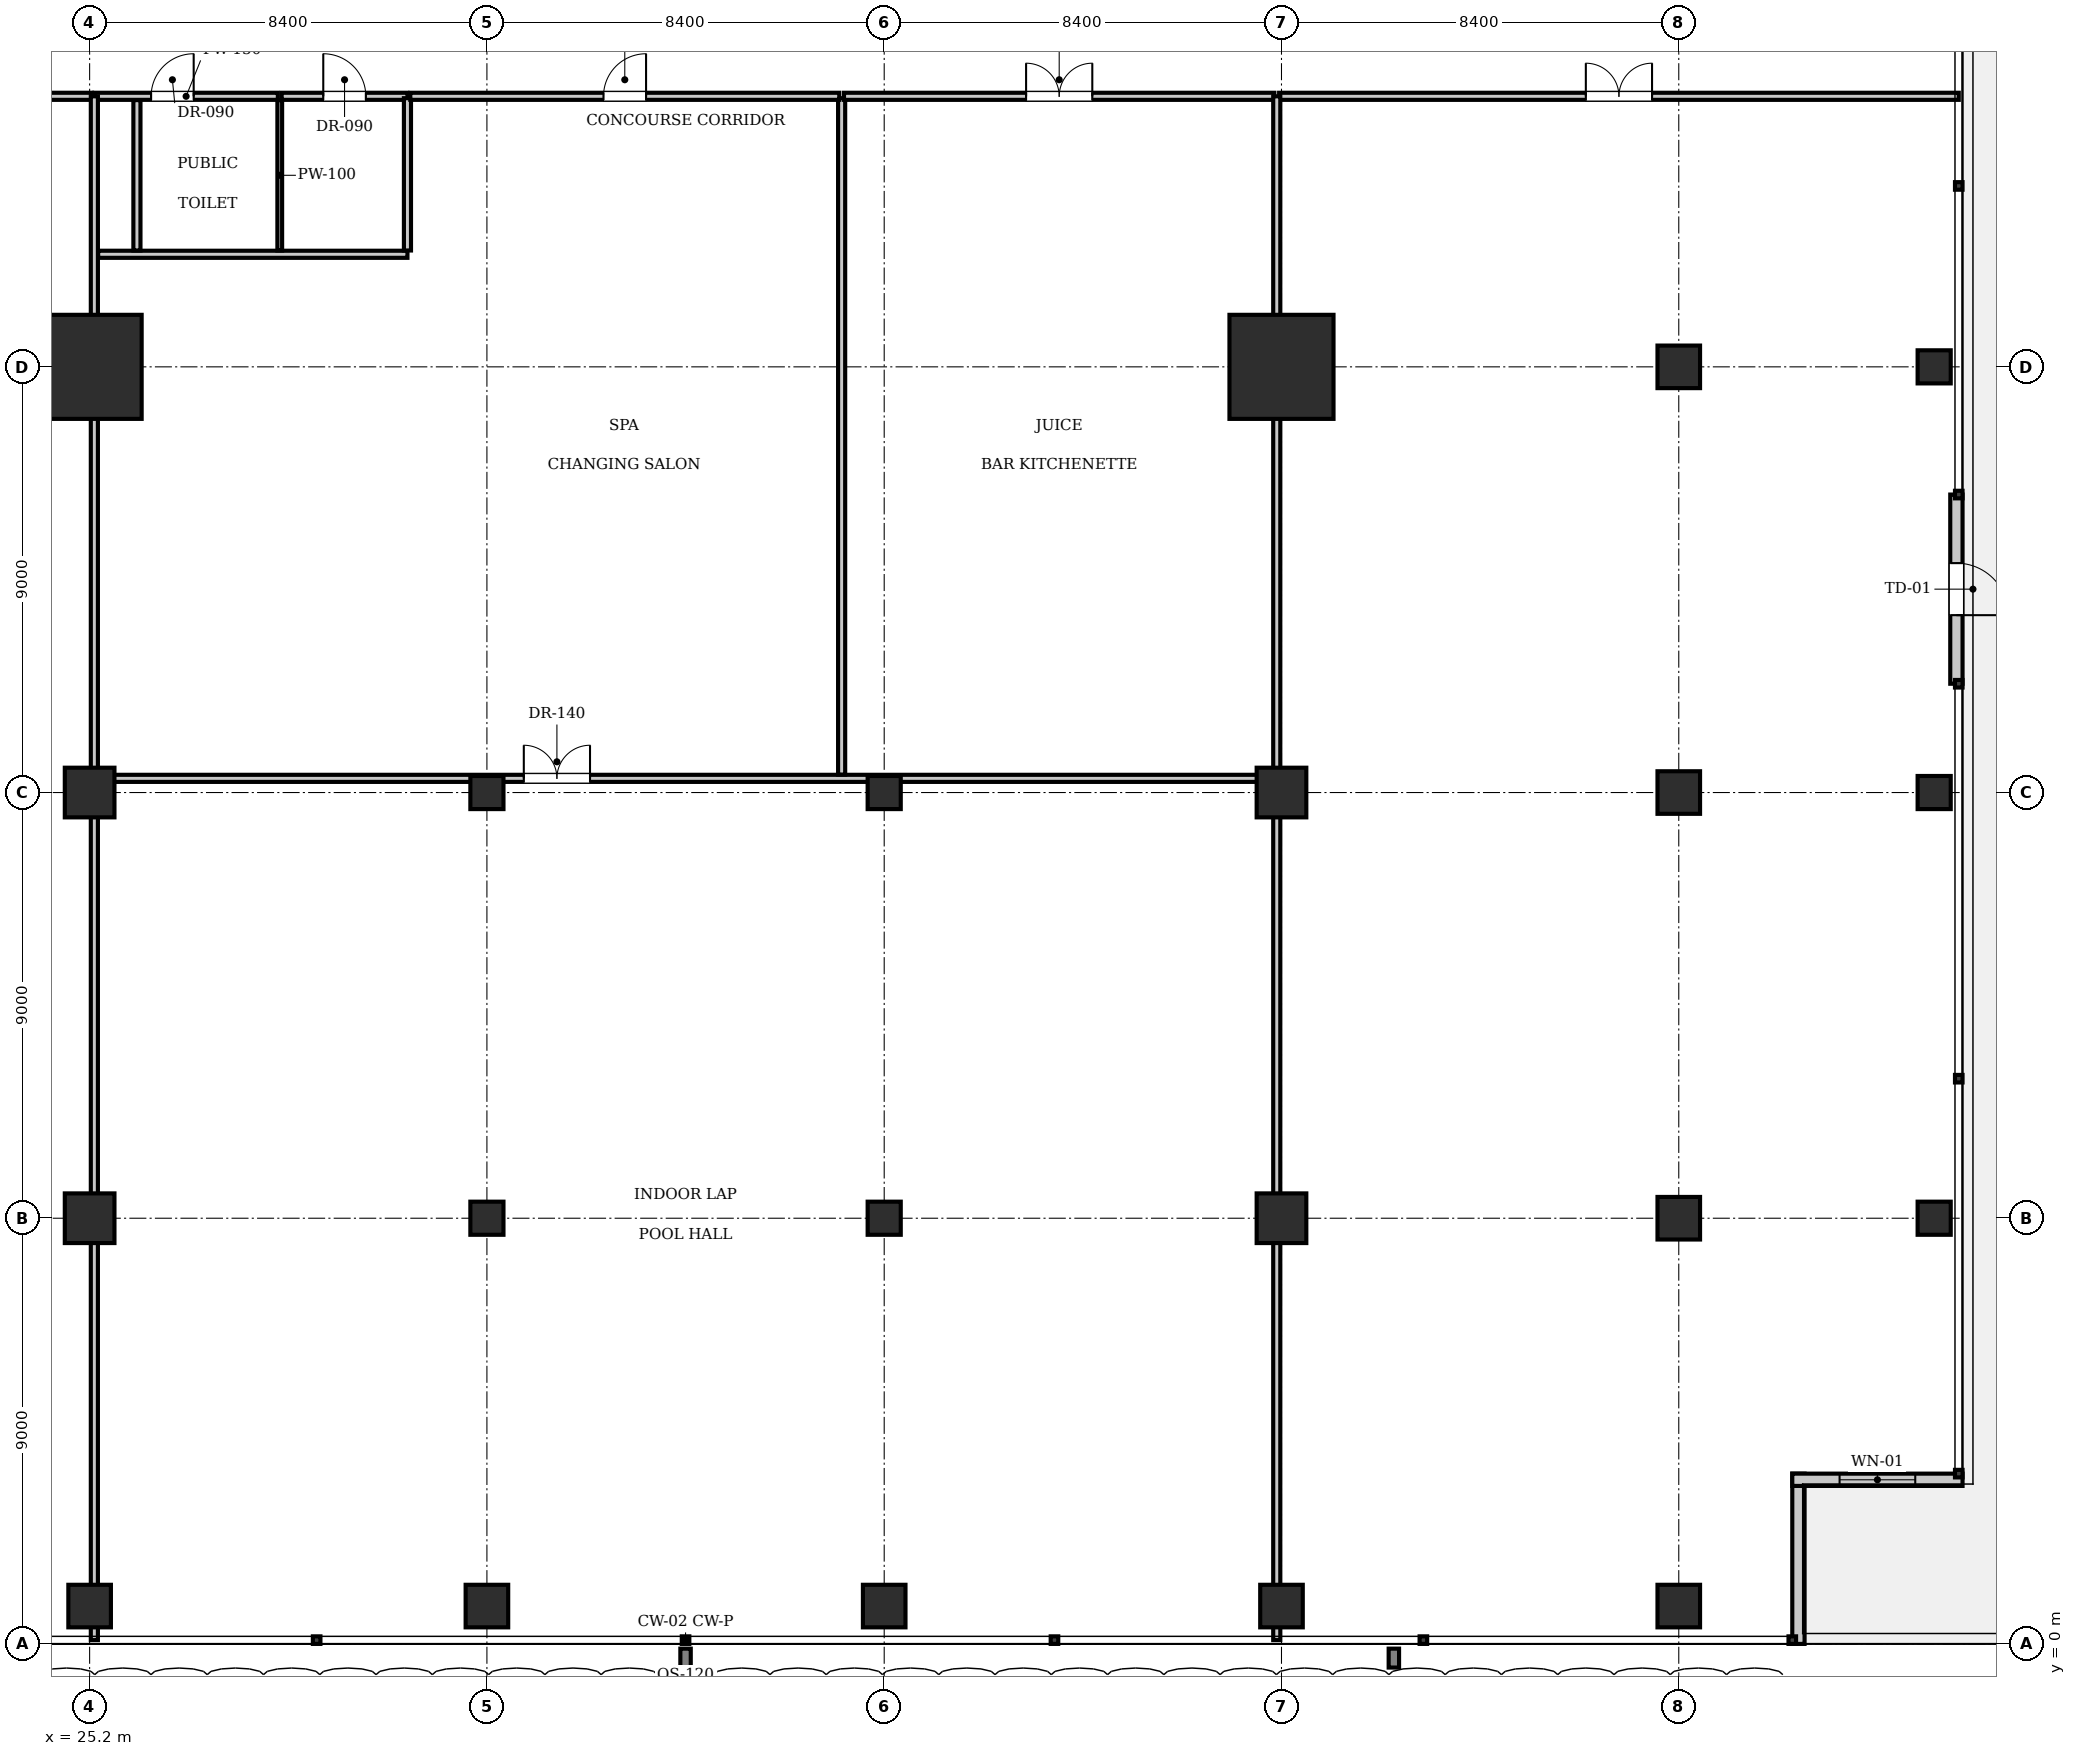
"""IFC4 building model, lengths in metres.
Left out: names, types, materials, properties, quantities, classifications, styles, units other than length and angle.
Written with IfcOpenShell. Run it as: python <this file> out.ifc"""

import sys

from ifc_helpers import new_model, si_unit, direction, frame, frame_2d, origin, origin_2d, place, context, subcontext, project, spatial, rectangle, i_section, extrude, element, fill, save


model = new_model("IFC4")
c1 = context("Model", 3, precision=1e-05, world=origin(), true_north=direction((0.0, 1.0)))
c2 = subcontext(c1, "Body", "Model", "MODEL_VIEW")
j1 = project(units=[si_unit("LENGTHUNIT", "METRE"), si_unit("PLANEANGLEUNIT", "RADIAN")], contexts=[c1])
p1 = place(None, origin())
s1 = spatial("IfcSite", under=j1, at=p1, CompositionType="ELEMENT")
p2 = place(p1, origin())
s2 = spatial("IfcBuilding", under=s1, at=p2, CompositionType="ELEMENT")
p3 = place(p2, frame((0.0, 0.0, 26.95)))
s3 = spatial("IfcBuildingStorey", under=s2, at=p3, CompositionType="ELEMENT", Elevation=26.95)
for number, where, z_axis, x_axis in (
    (1, (25.2, 27.0, 0.0), (0.0, 0.0, 1.0), (1.0, 0.0, 0.0)),
    (2, (50.4, 27.0, 0.0), (0.0, 0.0, 1.0), (1.0, 0.0, 0.0)),
):
    element("IfcColumn", number, at=place(p3, frame(where, z_axis=z_axis, x_axis=x_axis)), inside=s3, PredefinedType="COLUMN", context=c2, shape_type="SweptSolid", body=[
        extrude(rectangle(XDim=2.2, YDim=2.2, at=origin_2d()), origin(), (0.0, 0.0, 1.0), 3.85),
    ])
for number, where, z_axis, x_axis in (
    (3, (25.2, 18.0, 0.0), (0.0, 0.0, 1.0), (1.0, 0.0, 0.0)),
    (4, (50.4, 18.0, 0.0), (0.0, 0.0, 1.0), (1.0, 0.0, 0.0)),
    (5, (25.2, 9.0, 0.0), (0.0, 0.0, 1.0), (1.0, 0.0, 0.0)),
    (6, (50.4, 9.0, 0.0), (0.0, 0.0, 1.0), (1.0, 0.0, 0.0)),
):
    element("IfcColumn", number, at=place(p3, frame(where, z_axis=z_axis, x_axis=x_axis)), inside=s3, PredefinedType="COLUMN", context=c2, shape_type="SweptSolid", body=[
        extrude(rectangle(XDim=1.05, YDim=1.05, at=origin_2d()), origin(), (0.0, 0.0, 1.0), 3.85),
    ])
for number, where, z_axis, x_axis in (
    (7, (33.6, 9.0, -0.24), (0.0, 0.0, 1.0), (1.0, 0.0, 0.0)),
    (8, (42.0, 9.0, -0.24), (0.0, 0.0, 1.0), (1.0, 0.0, 0.0)),
    (9, (33.6, 18.0, -0.24), (0.0, 0.0, 1.0), (1.0, 0.0, 0.0)),
    (10, (42.0, 18.0, -0.24), (0.0, 0.0, 1.0), (1.0, 0.0, 0.0)),
):
    element("IfcColumn", number, at=place(p3, frame(where, z_axis=z_axis, x_axis=x_axis)), inside=s3, PredefinedType="COLUMN", context=c2, shape_type="SweptSolid", body=[
        extrude(i_section(OverallWidth=0.7, OverallDepth=0.7, WebThickness=0.028, FlangeThickness=0.044, at=origin_2d()), origin(), (0.0, 0.0, 1.0), 4.09),
    ])
for number, where, z_axis, x_axis in (
    (11, (58.8, 9.0, 0.0), (0.0, 0.0, 1.0), (1.0, 0.0, 0.0)),
    (12, (58.8, 18.0, 0.0), (0.0, 0.0, 1.0), (1.0, 0.0, 0.0)),
    (13, (58.8, 27.0, 0.0), (0.0, 0.0, 1.0), (1.0, 0.0, 0.0)),
    (14, (25.2, 0.8, 0.0), (0.0, 0.0, 1.0), (1.0, 0.0, 0.0)),
    (15, (33.6, 0.8, 0.0), (0.0, 0.0, 1.0), (1.0, 0.0, 0.0)),
    (16, (42.0, 0.8, 0.0), (0.0, 0.0, 1.0), (1.0, 0.0, 0.0)),
    (17, (50.4, 0.8, 0.0), (0.0, 0.0, 1.0), (1.0, 0.0, 0.0)),
    (18, (58.8, 0.8, 0.0), (0.0, 0.0, 1.0), (1.0, 0.0, 0.0)),
):
    element("IfcColumn", number, at=place(p3, frame(where, z_axis=z_axis, x_axis=x_axis)), inside=s3, PredefinedType="COLUMN", context=c2, shape_type="SweptSolid", body=[
        extrude(rectangle(XDim=0.9, YDim=0.9, at=origin_2d()), origin(), (0.0, 0.0, 1.0), 3.85),
    ])
for number, where, z_axis, x_axis in (
    (19, (64.2, 9.0, -0.24), (0.0, 0.0, 1.0), (1.0, 0.0, 0.0)),
    (20, (64.2, 18.0, -0.24), (0.0, 0.0, 1.0), (1.0, 0.0, 0.0)),
    (21, (64.2, 27.0, -0.24), (0.0, 0.0, 1.0), (1.0, 0.0, 0.0)),
):
    element("IfcColumn", number, at=place(p3, frame(where, z_axis=z_axis, x_axis=x_axis)), inside=s3, PredefinedType="COLUMN", context=c2, shape_type="SweptSolid", body=[
        extrude(i_section(OverallWidth=0.7, OverallDepth=0.7, WebThickness=0.028, FlangeThickness=0.044, at=origin_2d()), origin(), (0.0, 0.0, 1.0), 4.09),
    ])
p4 = place(p3, frame((61.33, 3.6, 0.0), z_axis=(0.0, 0.0, 1.0), x_axis=(0.0, -1.0, 0.0)))
e22 = element("IfcWall", 22, at=p4, inside=s3, PredefinedType="SOLIDWALL", context=c2, shape_type="SweptSolid", body=[
    extrude(rectangle(XDim=3.6, YDim=0.26, at=frame_2d((1.8, 0.0))), origin(), (0.0, 0.0, 1.0), 3.61),
])
p5 = place(p3, frame((64.8, 3.47, 0.0), z_axis=(0.0, 0.0, 1.0), x_axis=(-1.0, 0.0, 0.0)))
e23 = element("IfcWall", 23, at=p5, inside=s3, PredefinedType="SOLIDWALL", context=c2, shape_type="SweptSolid", body=[
    extrude(rectangle(XDim=3.6, YDim=0.26, at=frame_2d((1.8, 0.0))), origin(), (0.0, 0.0, 1.0), 3.61),
])
p6 = place(p5, frame((1.0, 0.0, 0.9)))
e24 = element("IfcOpeningElement", 24, at=p6, cuts=e23, PredefinedType="OPENING", context=c2, shape_type="SweptSolid", body=[
    extrude(rectangle(XDim=1.6, YDim=2.1, at=frame_2d((0.8, 1.05))), frame((0.0, 0.14, 0.0), z_axis=(0.0, -1.0, 0.0), x_axis=(1.0, 0.0, 0.0)), (0.0, 0.0, 1.0), 0.28),
])
p7 = place(p3, frame((64.67, 20.3, 0.0), z_axis=(0.0, 0.0, 1.0), x_axis=(0.0, 1.0, 0.0)))
e25 = element("IfcWall", 25, at=p7, inside=s3, PredefinedType="SOLIDWALL", context=c2, shape_type="SweptSolid", body=[
    extrude(rectangle(XDim=4.0, YDim=0.26, at=frame_2d((2.0, 0.0))), origin(), (0.0, 0.0, 1.0), 3.61),
])
p8 = place(p7, frame((1.45, 0.0, 0.0)))
e26 = element("IfcOpeningElement", 26, at=p8, cuts=e25, PredefinedType="OPENING", context=c2, shape_type="SweptSolid", body=[
    extrude(rectangle(XDim=1.1, YDim=2.2, at=frame_2d((0.55, 1.1))), frame((0.0, 0.14, 0.0), z_axis=(0.0, -1.0, 0.0), x_axis=(1.0, 0.0, 0.0)), (0.0, 0.0, 1.0), 0.28),
])
p9 = place(p3, frame((25.3, 32.72, 0.0), z_axis=(0.0, 0.0, 1.0), x_axis=(1.0, 0.0, 0.0)))
e27 = element("IfcWall", 27, at=p9, inside=s3, PredefinedType="PARTITIONING", context=c2, shape_type="SweptSolid", body=[
    extrude(rectangle(XDim=3.88, YDim=0.15, at=frame_2d((1.94, 0.0))), origin(), (0.0, 0.0, 1.0), 3.61),
])
p10 = place(p9, frame((1.2, 0.0, 0.0)))
e28 = element("IfcOpeningElement", 28, at=p10, cuts=e27, PredefinedType="OPENING", context=c2, shape_type="SweptSolid", body=[
    extrude(rectangle(XDim=0.9, YDim=2.1, at=frame_2d((0.45, 1.05))), frame((0.0, 0.085, 0.0), z_axis=(0.0, -1.0, 0.0), x_axis=(1.0, 0.0, 0.0)), (0.0, 0.0, 1.0), 0.17),
])
p11 = place(p3, frame((29.26, 32.72, 0.0), z_axis=(0.0, 0.0, 1.0), x_axis=(1.0, 0.0, 0.0)))
e29 = element("IfcWall", 29, at=p11, inside=s3, PredefinedType="PARTITIONING", context=c2, shape_type="SweptSolid", body=[
    extrude(rectangle(XDim=2.66, YDim=0.15, at=frame_2d((1.33, 0.0))), origin(), (0.0, 0.0, 1.0), 3.61),
])
p12 = place(p11, frame((0.88, 0.0, 0.0)))
e30 = element("IfcOpeningElement", 30, at=p12, cuts=e29, PredefinedType="OPENING", context=c2, shape_type="SweptSolid", body=[
    extrude(rectangle(XDim=0.9, YDim=2.1, at=frame_2d((0.45, 1.05))), frame((0.0, 0.085, 0.0), z_axis=(0.0, -1.0, 0.0), x_axis=(1.0, 0.0, 0.0)), (0.0, 0.0, 1.0), 0.17),
])
p13 = place(p3, frame((25.38, 29.38, 0.0), z_axis=(0.0, 0.0, 1.0), x_axis=(1.0, 0.0, 0.0)))
e31 = element("IfcWall", 31, at=p13, inside=s3, PredefinedType="PARTITIONING", context=c2, shape_type="SweptSolid", body=[
    extrude(rectangle(XDim=6.54, YDim=0.15, at=frame_2d((3.27, 0.0))), origin(), (0.0, 0.0, 1.0), 3.61),
])
p14 = place(p3, frame((26.2, 29.46, 0.0), z_axis=(0.0, 0.0, 1.0), x_axis=(0.0, 1.0, 0.0)))
e32 = element("IfcWall", 32, at=p14, inside=s3, PredefinedType="PARTITIONING", context=c2, shape_type="SweptSolid", body=[
    extrude(rectangle(XDim=3.18, YDim=0.15, at=frame_2d((1.59, 0.0))), origin(), (0.0, 0.0, 1.0), 3.61),
])
p15 = place(p3, frame((29.22, 29.46, 0.0), z_axis=(0.0, 0.0, 1.0), x_axis=(0.0, 1.0, 0.0)))
e33 = element("IfcWall", 33, at=p15, inside=s3, PredefinedType="PARTITIONING", context=c2, shape_type="SweptSolid", body=[
    extrude(rectangle(XDim=3.18, YDim=0.1, at=frame_2d((1.59, 0.0))), origin(), (0.0, 0.0, 1.0), 3.61),
])
p16 = place(p3, frame((31.92, 29.46, 0.0), z_axis=(0.0, 0.0, 1.0), x_axis=(0.0, 1.0, 0.0)))
e34 = element("IfcWall", 34, at=p16, inside=s3, PredefinedType="PARTITIONING", context=c2, shape_type="SweptSolid", body=[
    extrude(rectangle(XDim=3.22, YDim=0.15, at=frame_2d((1.61, 0.0))), origin(), (0.0, 0.0, 1.0), 3.61),
])
p17 = place(p3, frame((25.38, 18.3, 0.0), z_axis=(0.0, 0.0, 1.0), x_axis=(1.0, 0.0, 0.0)))
e35 = element("IfcWall", 35, at=p17, inside=s3, PredefinedType="PARTITIONING", context=c2, shape_type="SweptSolid", body=[
    extrude(rectangle(XDim=24.84, YDim=0.15, at=frame_2d((12.42, 0.0))), origin(), (0.0, 0.0, 1.0), 3.61),
])
p18 = place(p17, frame((9.0, 0.0, 0.0)))
e36 = element("IfcOpeningElement", 36, at=p18, cuts=e35, PredefinedType="OPENING", context=c2, shape_type="SweptSolid", body=[
    extrude(rectangle(XDim=1.4, YDim=2.2, at=frame_2d((0.7, 1.1))), frame((0.0, 0.085, 0.0), z_axis=(0.0, -1.0, 0.0), x_axis=(1.0, 0.0, 0.0)), (0.0, 0.0, 1.0), 0.17),
])
p19 = place(p3, frame((41.1, 18.38, 0.0), z_axis=(0.0, 0.0, 1.0), x_axis=(0.0, 1.0, 0.0)))
e37 = element("IfcWall", 37, at=p19, inside=s3, PredefinedType="PARTITIONING", context=c2, shape_type="SweptSolid", body=[
    extrude(rectangle(XDim=14.3, YDim=0.15, at=frame_2d((7.15, 0.0))), origin(), (0.0, 0.0, 1.0), 3.61),
])
p20 = place(p3, frame((10.88, 32.72, 0.0), z_axis=(0.0, 0.0, 1.0), x_axis=(1.0, 0.0, 0.0)))
e38 = element("IfcWall", 38, at=p20, inside=s3, PredefinedType="PARTITIONING", context=c2, shape_type="SweptSolid", body=[
    extrude(rectangle(XDim=14.37, YDim=0.15, at=frame_2d((7.185, 0.0))), origin(), (0.0, 0.0, 1.0), 3.61),
])
p21 = place(p20, frame((6.485, 0.0, 0.0)))
e39 = element("IfcOpeningElement", 39, at=p21, cuts=e38, PredefinedType="OPENING", context=c2, shape_type="SweptSolid", body=[
    extrude(rectangle(XDim=1.4, YDim=2.2, at=frame_2d((0.7, 1.1))), frame((0.0, 0.085, 0.0), z_axis=(0.0, -1.0, 0.0), x_axis=(1.0, 0.0, 0.0)), (0.0, 0.0, 1.0), 0.17),
])
p22 = place(p3, frame((31.98, 32.72, 0.0), z_axis=(0.0, 0.0, 1.0), x_axis=(1.0, 0.0, 0.0)))
e40 = element("IfcWall", 40, at=p22, inside=s3, PredefinedType="PARTITIONING", context=c2, shape_type="SweptSolid", body=[
    extrude(rectangle(XDim=9.07, YDim=0.15, at=frame_2d((4.535, 0.0))), origin(), (0.0, 0.0, 1.0), 3.61),
])
p23 = place(p22, frame((4.085, 0.0, 0.0)))
e41 = element("IfcOpeningElement", 41, at=p23, cuts=e40, PredefinedType="OPENING", context=c2, shape_type="SweptSolid", body=[
    extrude(rectangle(XDim=0.9, YDim=2.1, at=frame_2d((0.45, 1.05))), frame((0.0, 0.085, 0.0), z_axis=(0.0, -1.0, 0.0), x_axis=(1.0, 0.0, 0.0)), (0.0, 0.0, 1.0), 0.17),
])
p24 = place(p3, frame((41.15, 32.72, 0.0), z_axis=(0.0, 0.0, 1.0), x_axis=(1.0, 0.0, 0.0)))
e42 = element("IfcWall", 42, at=p24, inside=s3, PredefinedType="PARTITIONING", context=c2, shape_type="SweptSolid", body=[
    extrude(rectangle(XDim=9.1, YDim=0.15, at=frame_2d((4.55, 0.0))), origin(), (0.0, 0.0, 1.0), 3.61),
])
p25 = place(p24, frame((3.85, 0.0, 0.0)))
e43 = element("IfcOpeningElement", 43, at=p25, cuts=e42, PredefinedType="OPENING", context=c2, shape_type="SweptSolid", body=[
    extrude(rectangle(XDim=1.4, YDim=2.2, at=frame_2d((0.7, 1.1))), frame((0.0, 0.085, 0.0), z_axis=(0.0, -1.0, 0.0), x_axis=(1.0, 0.0, 0.0)), (0.0, 0.0, 1.0), 0.17),
])
p26 = place(p3, frame((50.35, 32.72, 0.0), z_axis=(0.0, 0.0, 1.0), x_axis=(1.0, 0.0, 0.0)))
e44 = element("IfcWall", 44, at=p26, inside=s3, PredefinedType="PARTITIONING", context=c2, shape_type="SweptSolid", body=[
    extrude(rectangle(XDim=14.37, YDim=0.15, at=frame_2d((7.185, 0.0))), origin(), (0.0, 0.0, 1.0), 3.61),
])
p27 = place(p26, frame((6.485, 0.0, 0.0)))
e45 = element("IfcOpeningElement", 45, at=p27, cuts=e44, PredefinedType="OPENING", context=c2, shape_type="SweptSolid", body=[
    extrude(rectangle(XDim=1.4, YDim=2.2, at=frame_2d((0.7, 1.1))), frame((0.0, 0.085, 0.0), z_axis=(0.0, -1.0, 0.0), x_axis=(1.0, 0.0, 0.0)), (0.0, 0.0, 1.0), 0.17),
])
for number, where, z_axis, x_axis in (
    (46, (25.3, 0.08, 0.0), (0.0, 0.0, 1.0), (0.0, 1.0, 0.0)),
    (47, (50.3, 0.08, 0.0), (0.0, 0.0, 1.0), (0.0, 1.0, 0.0)),
):
    element("IfcWall", number, at=place(p3, frame(where, z_axis=z_axis, x_axis=x_axis)), inside=s3, PredefinedType="PARTITIONING", context=c2, shape_type="SweptSolid", body=[
        extrude(rectangle(XDim=32.64, YDim=0.15, at=frame_2d((16.32, 0.0))), origin(), (0.0, 0.0, 1.0), 2.975),
    ])
p28 = place(p6, origin())
e48 = element("IfcWindow", 48, at=p28, inside=s3, PartitioningType="SINGLE_PANEL", PredefinedType="WINDOW", context=c2, shape_type="SweptSolid", body=[
    extrude(rectangle(XDim=1.6, YDim=2.1, at=frame_2d((0.8, 1.05))), frame((0.0, 0.03, 0.0), z_axis=(0.0, -1.0, 0.0), x_axis=(1.0, 0.0, 0.0)), (0.0, 0.0, 1.0), 0.06),
])
fill(e24, e48)
p29 = place(p8, frame((1.1, 0.0, 0.0), z_axis=(0.0, 0.0, 1.0), x_axis=(-1.0, 0.0, 0.0)))
e49 = element("IfcDoor", 49, at=p29, inside=s3, OperationType="SINGLE_SWING_RIGHT", PredefinedType="DOOR", context=c2, shape_type="SweptSolid", body=[
    extrude(rectangle(XDim=1.1, YDim=2.2, at=frame_2d((0.55, 1.1))), frame((0.0, 0.025, 0.0), z_axis=(0.0, -1.0, 0.0), x_axis=(1.0, 0.0, 0.0)), (0.0, 0.0, 1.0), 0.05),
])
fill(e26, e49)
p30 = place(p10, origin())
e50 = element("IfcDoor", 50, at=p30, inside=s3, OperationType="SINGLE_SWING_RIGHT", PredefinedType="DOOR", context=c2, shape_type="SweptSolid", body=[
    extrude(rectangle(XDim=0.9, YDim=2.1, at=frame_2d((0.45, 1.05))), frame((0.0, 0.025, 0.0), z_axis=(0.0, -1.0, 0.0), x_axis=(1.0, 0.0, 0.0)), (0.0, 0.0, 1.0), 0.05),
])
fill(e28, e50)
p31 = place(p12, origin())
e51 = element("IfcDoor", 51, at=p31, inside=s3, OperationType="SINGLE_SWING_LEFT", PredefinedType="DOOR", context=c2, shape_type="SweptSolid", body=[
    extrude(rectangle(XDim=0.9, YDim=2.1, at=frame_2d((0.45, 1.05))), frame((0.0, 0.025, 0.0), z_axis=(0.0, -1.0, 0.0), x_axis=(1.0, 0.0, 0.0)), (0.0, 0.0, 1.0), 0.05),
])
fill(e30, e51)
p32 = place(p18, origin())
e52 = element("IfcDoor", 52, at=p32, inside=s3, OperationType="DOUBLE_DOOR_SINGLE_SWING", PredefinedType="DOOR", context=c2, shape_type="SweptSolid", body=[
    extrude(rectangle(XDim=1.4, YDim=2.2, at=frame_2d((0.7, 1.1))), frame((0.0, 0.025, 0.0), z_axis=(0.0, -1.0, 0.0), x_axis=(1.0, 0.0, 0.0)), (0.0, 0.0, 1.0), 0.05),
])
fill(e36, e52)
p33 = place(p23, origin())
e53 = element("IfcDoor", 53, at=p33, inside=s3, OperationType="SINGLE_SWING_RIGHT", PredefinedType="DOOR", context=c2, shape_type="SweptSolid", body=[
    extrude(rectangle(XDim=0.9, YDim=2.1, at=frame_2d((0.45, 1.05))), frame((0.0, 0.025, 0.0), z_axis=(0.0, -1.0, 0.0), x_axis=(1.0, 0.0, 0.0)), (0.0, 0.0, 1.0), 0.05),
])
fill(e41, e53)
p34 = place(p25, origin())
e54 = element("IfcDoor", 54, at=p34, inside=s3, OperationType="DOUBLE_DOOR_SINGLE_SWING", PredefinedType="DOOR", context=c2, shape_type="SweptSolid", body=[
    extrude(rectangle(XDim=1.4, YDim=2.2, at=frame_2d((0.7, 1.1))), frame((0.0, 0.025, 0.0), z_axis=(0.0, -1.0, 0.0), x_axis=(1.0, 0.0, 0.0)), (0.0, 0.0, 1.0), 0.05),
])
fill(e43, e54)
p35 = place(p27, origin())
e55 = element("IfcDoor", 55, at=p35, inside=s3, OperationType="DOUBLE_DOOR_SINGLE_SWING", PredefinedType="DOOR", context=c2, shape_type="SweptSolid", body=[
    extrude(rectangle(XDim=1.4, YDim=2.2, at=frame_2d((0.7, 1.1))), frame((0.0, 0.025, 0.0), z_axis=(0.0, -1.0, 0.0), x_axis=(1.0, 0.0, 0.0)), (0.0, 0.0, 1.0), 0.05),
])
fill(e45, e55)
save(model, sys.argv[1])
